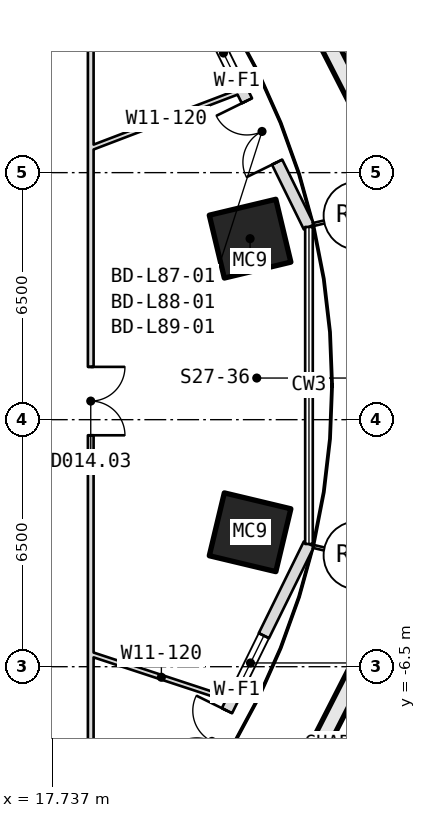
"""IFC4 building model, lengths in metres.
Left out: names, types, materials, properties, quantities, classifications, styles, units other than length and angle.
Written with IfcOpenShell. Run it as: python <this file> out.ifc"""

import sys

from ifc_helpers import new_model, si_unit, direction, frame, frame_2d, origin, origin_2d, place, context, subcontext, project, spatial, rectangle, hollow_rectangle, extrude, element, fill, save


model = new_model("IFC4")
c1 = context("Model", 3, precision=1e-05, world=origin(), true_north=direction((0.0, 1.0)))
c2 = subcontext(c1, "Body", "Model", "MODEL_VIEW")
j1 = project(units=[si_unit("LENGTHUNIT", "METRE"), si_unit("PLANEANGLEUNIT", "RADIAN")], contexts=[c1])
p1 = place(None, origin())
s1 = spatial("IfcSite", under=j1, at=p1, CompositionType="ELEMENT")
p2 = place(p1, origin())
s2 = spatial("IfcBuilding", under=s1, at=p2, CompositionType="ELEMENT")
p3 = place(p2, frame((0.0, 0.0, 384.1)))
s3 = spatial("IfcBuildingStorey", under=s2, at=p3, CompositionType="ELEMENT", Elevation=384.1)
for number, where, z_axis, x_axis in (
    (1, (22.943, 4.763, -0.18), (0.0, 0.0, 1.0), (0.233, -0.973, 0.0)),
    (2, (22.943, -2.963, -0.18), (0.0, 0.0, 1.0), (-0.233, -0.973, 0.0)),
):
    element("IfcColumn", number, at=place(p3, frame(where, z_axis=z_axis, x_axis=x_axis)), inside=s3, PredefinedType="COLUMN", context=c2, shape_type="SweptSolid", body=[
        extrude(hollow_rectangle(XDim=1.7, YDim=1.8, WallThickness=0.05, at=origin_2d()), origin(), (0.0, 0.0, 1.0), 4.15),
    ])
p4 = place(p3, frame((24.492, 5.071, 0.0), z_axis=(0.0, 0.0, 1.0), x_axis=(-0.441245353493, 0.897386504256, 0.0)))
e3 = element("IfcWall", 3, at=p4, inside=s3, PredefinedType="SOLIDWALL", context=c2, shape_type="SweptSolid", body=[
    extrude(rectangle(XDim=8.588, YDim=0.3, at=frame_2d((4.294, 0.0))), origin(), (0.0, 0.0, 1.0), 3.97),
])
p5 = place(p4, frame((1.9, 0.0, 0.0)))
e4 = element("IfcOpeningElement", 4, at=p5, cuts=e3, PredefinedType="OPENING", context=c2, shape_type="SweptSolid", body=[
    extrude(rectangle(XDim=1.8, YDim=2.4, at=frame_2d((0.9, 1.2))), frame((0.0, 0.16, 0.0), z_axis=(0.0, -1.0, 0.0), x_axis=(1.0, 0.0, 0.0)), (0.0, 0.0, 1.0), 0.32),
])
p6 = place(p4, frame((4.3, 0.0, 0.9)))
e5 = element("IfcOpeningElement", 5, at=p6, cuts=e3, PredefinedType="OPENING", context=c2, shape_type="SweptSolid", body=[
    extrude(rectangle(XDim=1.6, YDim=1.5, at=frame_2d((0.8, 0.75))), frame((0.0, 0.16, 0.0), z_axis=(0.0, -1.0, 0.0), x_axis=(1.0, 0.0, 0.0)), (0.0, 0.0, 1.0), 0.32),
])
p7 = place(p3, frame((20.703, -10.978, 0.0), z_axis=(0.0, 0.0, 1.0), x_axis=(0.441245353493, 0.897386504256, 0.0)))
e6 = element("IfcWall", 6, at=p7, inside=s3, PredefinedType="SOLIDWALL", context=c2, shape_type="SweptSolid", body=[
    extrude(rectangle(XDim=8.588, YDim=0.3, at=frame_2d((4.294, 0.0))), origin(), (0.0, 0.0, 1.0), 3.97),
])
p8 = place(p7, frame((1.9, 0.0, 0.0)))
e7 = element("IfcOpeningElement", 7, at=p8, cuts=e6, PredefinedType="OPENING", context=c2, shape_type="SweptSolid", body=[
    extrude(rectangle(XDim=1.8, YDim=2.4, at=frame_2d((0.9, 1.2))), frame((0.0, 0.16, 0.0), z_axis=(0.0, -1.0, 0.0), x_axis=(1.0, 0.0, 0.0)), (0.0, 0.0, 1.0), 0.32),
])
p9 = place(p7, frame((4.3, 0.0, 0.9)))
e8 = element("IfcOpeningElement", 8, at=p9, cuts=e6, PredefinedType="OPENING", context=c2, shape_type="SweptSolid", body=[
    extrude(rectangle(XDim=1.6, YDim=1.5, at=frame_2d((0.8, 0.75))), frame((0.0, 0.16, 0.0), z_axis=(0.0, -1.0, 0.0), x_axis=(1.0, 0.0, 0.0)), (0.0, 0.0, 1.0), 0.32),
])
p10 = place(p3, frame((18.75, -6.166, 0.0), z_axis=(0.0, 0.0, 1.0), x_axis=(0.949948202416, -0.312407446657, 0.0)))
e9 = element("IfcWall", 9, at=p10, inside=s3, PredefinedType="PARTITIONING", context=c2, shape_type="SweptSolid", body=[
    extrude(rectangle(XDim=3.914, YDim=0.12, at=frame_2d((1.957, 0.0))), origin(), (0.0, 0.0, 1.0), 3.97),
])
p11 = place(p3, frame((18.75, 7.145, 0.0), z_axis=(0.0, 0.0, 1.0), x_axis=(0.934470468692, 0.35604064816, 0.0)))
e10 = element("IfcWall", 10, at=p11, inside=s3, PredefinedType="PARTITIONING", context=c2, shape_type="SweptSolid", body=[
    extrude(rectangle(XDim=4.256, YDim=0.12, at=frame_2d((2.128, 0.0))), origin(), (0.0, 0.0, 1.0), 3.97),
])
p12 = place(p3, frame((18.75, 11.139, 0.0), z_axis=(0.0, 0.0, 1.0), x_axis=(0.0, -1.0, 0.0)))
e11 = element("IfcWall", 11, at=p12, inside=s3, PredefinedType="PARTITIONING", context=c2, shape_type="SweptSolid", body=[
    extrude(rectangle(XDim=20.518, YDim=0.15, at=frame_2d((10.259, 0.0))), origin(), (0.0, 0.0, 1.0), 3.97),
])
p13 = place(p12, frame((9.75, 0.0, 0.0)))
e12 = element("IfcOpeningElement", 12, at=p13, cuts=e11, PredefinedType="OPENING", context=c2, shape_type="SweptSolid", body=[
    extrude(rectangle(XDim=1.8, YDim=2.1, at=frame_2d((0.9, 1.05))), frame((0.0, 0.085, 0.0), z_axis=(0.0, -1.0, 0.0), x_axis=(1.0, 0.0, 0.0)), (0.0, 0.0, 1.0), 0.17),
])
p14 = place(p5, origin())
e13 = element("IfcDoor", 13, at=p14, inside=s3, OperationType="SINGLE_SWING_LEFT", PredefinedType="DOOR", context=c2, shape_type="SweptSolid", body=[
    extrude(rectangle(XDim=1.8, YDim=2.4, at=frame_2d((0.9, 1.2))), frame((0.0, 0.025, 0.0), z_axis=(0.0, -1.0, 0.0), x_axis=(1.0, 0.0, 0.0)), (0.0, 0.0, 1.0), 0.05),
])
fill(e4, e13)
p15 = place(p6, origin())
e14 = element("IfcWindow", 14, at=p15, inside=s3, PartitioningType="SINGLE_PANEL", PredefinedType="WINDOW", context=c2, shape_type="SweptSolid", body=[
    extrude(rectangle(XDim=1.6, YDim=1.5, at=frame_2d((0.8, 0.75))), frame((0.0, 0.03, 0.0), z_axis=(0.0, -1.0, 0.0), x_axis=(1.0, 0.0, 0.0)), (0.0, 0.0, 1.0), 0.06),
])
fill(e5, e14)
p16 = place(p8, origin())
e15 = element("IfcDoor", 15, at=p16, inside=s3, OperationType="SINGLE_SWING_LEFT", PredefinedType="DOOR", context=c2, shape_type="SweptSolid", body=[
    extrude(rectangle(XDim=1.8, YDim=2.4, at=frame_2d((0.9, 1.2))), frame((0.0, 0.025, 0.0), z_axis=(0.0, -1.0, 0.0), x_axis=(1.0, 0.0, 0.0)), (0.0, 0.0, 1.0), 0.05),
])
fill(e7, e15)
p17 = place(p9, origin())
e16 = element("IfcWindow", 16, at=p17, inside=s3, PartitioningType="SINGLE_PANEL", PredefinedType="WINDOW", context=c2, shape_type="SweptSolid", body=[
    extrude(rectangle(XDim=1.6, YDim=1.5, at=frame_2d((0.8, 0.75))), frame((0.0, 0.03, 0.0), z_axis=(0.0, -1.0, 0.0), x_axis=(1.0, 0.0, 0.0)), (0.0, 0.0, 1.0), 0.06),
])
fill(e8, e16)
p18 = place(p13, origin())
e17 = element("IfcDoor", 17, at=p18, inside=s3, OperationType="DOUBLE_DOOR_SINGLE_SWING", PredefinedType="DOOR", context=c2, shape_type="SweptSolid", body=[
    extrude(rectangle(XDim=1.8, YDim=2.1, at=frame_2d((0.9, 1.05))), frame((0.0, 0.025, 0.0), z_axis=(0.0, -1.0, 0.0), x_axis=(1.0, 0.0, 0.0)), (0.0, 0.0, 1.0), 0.05),
])
fill(e12, e17)
save(model, sys.argv[1])
